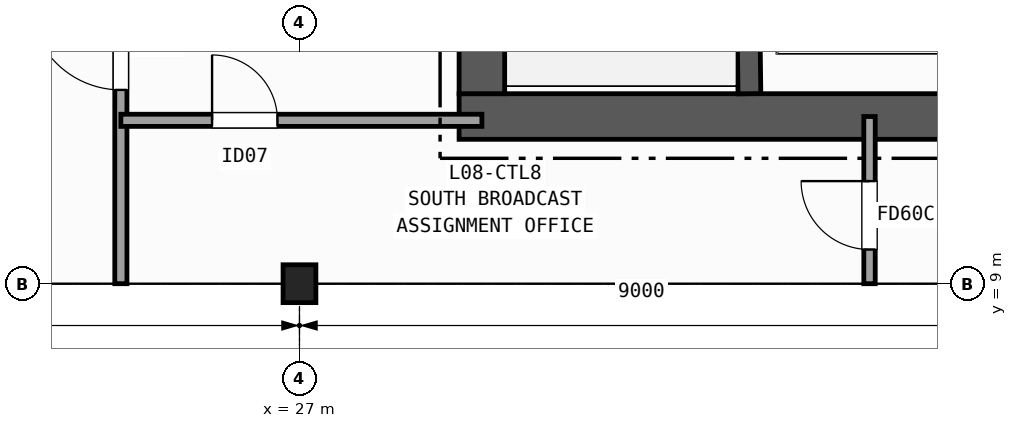
"""IFC4 building model, lengths in metres.
Left out: names, types, materials, properties, quantities, classifications, styles, units other than length and angle.
Written with IfcOpenShell. Run it as: python <this file> out.ifc"""

import sys

from ifc_helpers import new_model, si_unit, direction, frame, frame_2d, origin, origin_2d, place, context, subcontext, project, spatial, rectangle, i_section, extrude, element, fill, save


model = new_model("IFC4")
c1 = context("Model", 3, precision=1e-05, world=origin(), true_north=direction((0.0, 1.0)))
c2 = subcontext(c1, "Body", "Model", "MODEL_VIEW")
j1 = project(units=[si_unit("LENGTHUNIT", "METRE"), si_unit("PLANEANGLEUNIT", "RADIAN")], contexts=[c1])
p1 = place(None, origin())
s1 = spatial("IfcSite", under=j1, at=p1, CompositionType="ELEMENT")
p2 = place(p1, origin())
s2 = spatial("IfcBuilding", under=s1, at=p2, CompositionType="ELEMENT")
p3 = place(p2, frame((0.0, 0.0, 39.7)))
s3 = spatial("IfcBuildingStorey", under=s2, at=p3, CompositionType="ELEMENT", Elevation=39.7)
p4 = place(p3, frame((27.0, 9.0, 0.0), z_axis=(0.0, 0.0, 1.0), x_axis=(1.0, 0.0, 0.0)))
e1 = element("IfcColumn", 1, at=p4, inside=s3, PredefinedType="COLUMN", context=c2, shape_type="SweptSolid", body=[
    extrude(i_section(OverallWidth=0.432, OverallDepth=0.498, WebThickness=0.056, FlangeThickness=0.089, FilletRadius=0.015, at=origin_2d()), origin(), (0.0, 0.0, 1.0), 3.7),
])
p5 = place(p3, frame((29.1, 11.2, 0.0), z_axis=(0.0, 0.0, 1.0), x_axis=(1.0, 0.0, 0.0)))
e2 = element("IfcWall", 2, at=p5, inside=s3, PredefinedType="SHEAR", context=c2, shape_type="SweptSolid", body=[
    extrude(rectangle(XDim=14.0, YDim=0.6, at=frame_2d((7.0, 0.0))), origin(), (0.0, 0.0, 1.0), 3.42),
])
p6 = place(p3, frame((29.4, 24.3, 0.0), z_axis=(0.0, 0.0, 1.0), x_axis=(0.0, -1.0, 0.0)))
e3 = element("IfcWall", 3, at=p6, inside=s3, PredefinedType="SHEAR", context=c2, shape_type="SweptSolid", body=[
    extrude(rectangle(XDim=12.8, YDim=0.6, at=frame_2d((6.4, 0.0))), origin(), (0.0, 0.0, 1.0), 3.42),
])
p7 = place(p6, frame((1.4, 0.0, 0.0)))
e4 = element("IfcOpeningElement", 4, at=p7, cuts=e3, PredefinedType="OPENING", context=c2, shape_type="SweptSolid", body=[
    extrude(rectangle(XDim=1.35, YDim=2.15, at=frame_2d((0.675, 1.075))), frame((0.0, 0.31, 0.0), z_axis=(0.0, -1.0, 0.0), x_axis=(1.0, 0.0, 0.0)), (0.0, 0.0, 1.0), 0.62),
])
p8 = place(p3, frame((32.92, 11.5, 0.0), z_axis=(0.0, 0.0, 1.0), x_axis=(-0.013244407292, 0.999912288991, 0.0)))
e5 = element("IfcWall", 5, at=p8, inside=s3, PredefinedType="SHEAR", context=c2, shape_type="SweptSolid", body=[
    extrude(rectangle(XDim=9.051, YDim=0.3, at=frame_2d((4.525, 0.0))), origin(), (0.0, 0.0, 1.0), 3.42),
])
p9 = place(p3, frame((24.65, 9.0, 0.0), z_axis=(0.0, 0.0, 1.0), x_axis=(0.0, 1.0, 0.0)))
e6 = element("IfcWall", 6, at=p9, inside=s3, PredefinedType="PARTITIONING", context=c2, shape_type="SweptSolid", body=[
    extrude(rectangle(XDim=19.2, YDim=0.16, at=frame_2d((9.6, 0.0))), origin(), (0.0, 0.0, 1.0), 2.627),
])
p10 = place(p9, frame((2.55, 0.0, 0.0)))
e7 = element("IfcOpeningElement", 7, at=p10, cuts=e6, PredefinedType="OPENING", context=c2, shape_type="SweptSolid", body=[
    extrude(rectangle(XDim=1.2, YDim=2.15, at=frame_2d((0.6, 1.075))), frame((0.0, 0.09, 0.0), z_axis=(0.0, -1.0, 0.0), x_axis=(1.0, 0.0, 0.0)), (0.0, 0.0, 1.0), 0.18),
])
p11 = place(p9, frame((8.55, 0.0, 0.0)))
e8 = element("IfcOpeningElement", 8, at=p11, cuts=e6, PredefinedType="OPENING", context=c2, shape_type="SweptSolid", body=[
    extrude(rectangle(XDim=0.86, YDim=2.05, at=frame_2d((0.43, 1.025))), frame((0.0, 0.09, 0.0), z_axis=(0.0, -1.0, 0.0), x_axis=(1.0, 0.0, 0.0)), (0.0, 0.0, 1.0), 0.18),
])
p12 = place(p9, frame((13.44, 0.0, 0.0)))
e9 = element("IfcOpeningElement", 9, at=p12, cuts=e6, PredefinedType="OPENING", context=c2, shape_type="SweptSolid", body=[
    extrude(rectangle(XDim=0.95, YDim=2.1, at=frame_2d((0.475, 1.05))), frame((0.0, 0.09, 0.0), z_axis=(0.0, -1.0, 0.0), x_axis=(1.0, 0.0, 0.0)), (0.0, 0.0, 1.0), 0.18),
])
p13 = place(p3, frame((24.65, 11.15, 0.0), z_axis=(0.0, 0.0, 1.0), x_axis=(1.0, 0.0, 0.0)))
e10 = element("IfcWall", 10, at=p13, inside=s3, PredefinedType="PARTITIONING", context=c2, shape_type="SweptSolid", body=[
    extrude(rectangle(XDim=4.75, YDim=0.16, at=frame_2d((2.375, 0.0))), origin(), (0.0, 0.0, 1.0), 2.792),
])
p14 = place(p13, frame((1.2, 0.0, 0.0)))
e11 = element("IfcOpeningElement", 11, at=p14, cuts=e10, PredefinedType="OPENING", context=c2, shape_type="SweptSolid", body=[
    extrude(rectangle(XDim=0.86, YDim=2.05, at=frame_2d((0.43, 1.025))), frame((0.0, 0.09, 0.0), z_axis=(0.0, -1.0, 0.0), x_axis=(1.0, 0.0, 0.0)), (0.0, 0.0, 1.0), 0.18),
])
p15 = place(p3, frame((34.5, 9.0, 0.0), z_axis=(0.0, 0.0, 1.0), x_axis=(0.0, 1.0, 0.0)))
e12 = element("IfcWall", 12, at=p15, inside=s3, PredefinedType="PARTITIONING", context=c2, shape_type="SweptSolid", body=[
    extrude(rectangle(XDim=2.2, YDim=0.15, at=frame_2d((1.1, 0.0))), origin(), (0.0, 0.0, 1.0), 2.627),
])
p16 = place(p15, frame((0.45, 0.0, 0.0)))
e13 = element("IfcOpeningElement", 13, at=p16, cuts=e12, PredefinedType="OPENING", context=c2, shape_type="SweptSolid", body=[
    extrude(rectangle(XDim=0.9, YDim=2.1, at=frame_2d((0.45, 1.05))), frame((0.0, 0.085, 0.0), z_axis=(0.0, -1.0, 0.0), x_axis=(1.0, 0.0, 0.0)), (0.0, 0.0, 1.0), 0.17),
])
p17 = place(p10, origin())
e14 = element("IfcDoor", 14, at=p17, inside=s3, OperationType="SINGLE_SWING_RIGHT", PredefinedType="DOOR", context=c2, shape_type="SweptSolid", body=[
    extrude(rectangle(XDim=1.2, YDim=2.15, at=frame_2d((0.6, 1.075))), frame((0.0, 0.025, 0.0), z_axis=(0.0, -1.0, 0.0), x_axis=(1.0, 0.0, 0.0)), (0.0, 0.0, 1.0), 0.05),
])
fill(e7, e14)
p18 = place(p14, origin())
e15 = element("IfcDoor", 15, at=p18, inside=s3, OperationType="SINGLE_SWING_LEFT", PredefinedType="DOOR", context=c2, shape_type="SweptSolid", body=[
    extrude(rectangle(XDim=0.86, YDim=2.05, at=frame_2d((0.43, 1.025))), frame((0.0, 0.025, 0.0), z_axis=(0.0, -1.0, 0.0), x_axis=(1.0, 0.0, 0.0)), (0.0, 0.0, 1.0), 0.05),
])
fill(e11, e15)
p19 = place(p16, origin())
e16 = element("IfcDoor", 16, at=p19, inside=s3, OperationType="SINGLE_SWING_RIGHT", PredefinedType="DOOR", context=c2, shape_type="SweptSolid", body=[
    extrude(rectangle(XDim=0.9, YDim=2.1, at=frame_2d((0.45, 1.05))), frame((0.0, 0.025, 0.0), z_axis=(0.0, -1.0, 0.0), x_axis=(1.0, 0.0, 0.0)), (0.0, 0.0, 1.0), 0.05),
])
fill(e13, e16)
save(model, sys.argv[1])
